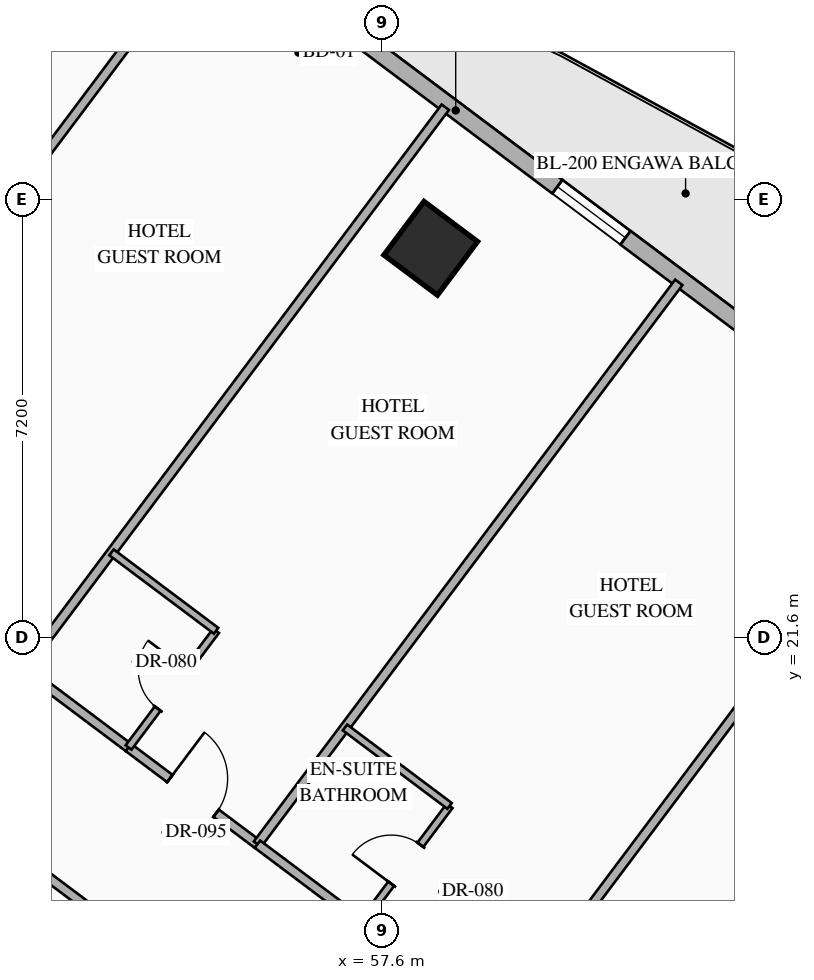
"""IFC4 building model, lengths in metres.
Left out: names, types, materials, properties, quantities, classifications, styles, units other than length and angle.
Written with IfcOpenShell. Run it as: python <this file> out.ifc"""

import sys

from ifc_helpers import new_model, si_unit, direction, frame, frame_2d, origin, origin_2d, place, context, subcontext, project, spatial, rectangle, hollow_rectangle, extrude, element, fill, save


model = new_model("IFC4")
c1 = context("Model", 3, precision=1e-05, world=origin(), true_north=direction((0.0, 1.0)))
c2 = subcontext(c1, "Body", "Model", "MODEL_VIEW")
j1 = project(units=[si_unit("LENGTHUNIT", "METRE"), si_unit("PLANEANGLEUNIT", "RADIAN")], contexts=[c1])
p1 = place(None, origin())
s1 = spatial("IfcSite", under=j1, at=p1, CompositionType="ELEMENT")
p2 = place(p1, origin())
s2 = spatial("IfcBuilding", under=s1, at=p2, CompositionType="ELEMENT")
p3 = place(p2, frame((0.0, 0.0, 43.3)))
s3 = spatial("IfcBuildingStorey", under=s2, at=p3, CompositionType="ELEMENT", Elevation=43.3)
p4 = place(p3, frame((58.4, 28.0, 0.0), z_axis=(0.0, 0.0, 1.0), x_axis=(0.799999996291, -0.600000004945, 0.0)))
e1 = element("IfcColumn", 1, at=p4, inside=s3, PredefinedType="COLUMN", context=c2, shape_type="SweptSolid", body=[
    extrude(hollow_rectangle(XDim=1.1, YDim=1.1, WallThickness=0.04, at=origin_2d()), origin(), (0.0, 0.0, 1.0), 3.35),
])
p5 = place(p3, frame((44.86, 40.73, 0.0), z_axis=(0.0, 0.0, 1.0), x_axis=(0.800006902154, -0.599990797017, 0.0)))
e2 = element("IfcWall", 2, at=p5, inside=s3, PredefinedType="STANDARD", context=c2, shape_type="SweptSolid", body=[
    extrude(rectangle(XDim=29.712, YDim=0.28, at=frame_2d((14.856, 0.0))), origin(), (0.0, 0.0, 1.0), 3.13),
])
p6 = place(p5, frame((14.249, 0.0, 0.0)))
e3 = element("IfcOpeningElement", 3, at=p6, cuts=e2, PredefinedType="OPENING", context=c2, shape_type="SweptSolid", body=[
    extrude(rectangle(XDim=1.1, YDim=2.2, at=frame_2d((0.55, 1.1))), frame((0.0, 0.15, 0.0), z_axis=(0.0, -1.0, 0.0), x_axis=(1.0, 0.0, 0.0)), (0.0, 0.0, 1.0), 0.3),
])
p7 = place(p5, frame((1.612, 0.0, 0.85)))
e4 = element("IfcOpeningElement", 4, at=p7, cuts=e2, PredefinedType="OPENING", context=c2, shape_type="SweptSolid", body=[
    extrude(rectangle(XDim=1.4, YDim=1.8, at=frame_2d((0.7, 0.9))), frame((0.0, 0.15, 0.0), z_axis=(0.0, -1.0, 0.0), x_axis=(1.0, 0.0, 0.0)), (0.0, 0.0, 1.0), 0.3),
])
p8 = place(p5, frame((5.667, 0.0, 0.85)))
e5 = element("IfcOpeningElement", 5, at=p8, cuts=e2, PredefinedType="OPENING", context=c2, shape_type="SweptSolid", body=[
    extrude(rectangle(XDim=1.4, YDim=1.8, at=frame_2d((0.7, 0.9))), frame((0.0, 0.15, 0.0), z_axis=(0.0, -1.0, 0.0), x_axis=(1.0, 0.0, 0.0)), (0.0, 0.0, 1.0), 0.3),
])
p9 = place(p5, frame((9.912, 0.0, 0.85)))
e6 = element("IfcOpeningElement", 6, at=p9, cuts=e2, PredefinedType="OPENING", context=c2, shape_type="SweptSolid", body=[
    extrude(rectangle(XDim=1.4, YDim=1.8, at=frame_2d((0.7, 0.9))), frame((0.0, 0.15, 0.0), z_axis=(0.0, -1.0, 0.0), x_axis=(1.0, 0.0, 0.0)), (0.0, 0.0, 1.0), 0.3),
])
p10 = place(p5, frame((19.528, 0.0, 0.85)))
e7 = element("IfcOpeningElement", 7, at=p10, cuts=e2, PredefinedType="OPENING", context=c2, shape_type="SweptSolid", body=[
    extrude(rectangle(XDim=1.4, YDim=1.8, at=frame_2d((0.7, 0.9))), frame((0.0, 0.15, 0.0), z_axis=(0.0, -1.0, 0.0), x_axis=(1.0, 0.0, 0.0)), (0.0, 0.0, 1.0), 0.3),
])
p11 = place(p5, frame((23.451, 0.0, 0.85)))
e8 = element("IfcOpeningElement", 8, at=p11, cuts=e2, PredefinedType="OPENING", context=c2, shape_type="SweptSolid", body=[
    extrude(rectangle(XDim=1.4, YDim=1.8, at=frame_2d((0.7, 0.9))), frame((0.0, 0.15, 0.0), z_axis=(0.0, -1.0, 0.0), x_axis=(1.0, 0.0, 0.0)), (0.0, 0.0, 1.0), 0.3),
])
p12 = place(p5, frame((27.852, 0.0, 0.85)))
e9 = element("IfcOpeningElement", 9, at=p12, cuts=e2, PredefinedType="OPENING", context=c2, shape_type="SweptSolid", body=[
    extrude(rectangle(XDim=1.4, YDim=1.8, at=frame_2d((0.7, 0.9))), frame((0.0, 0.15, 0.0), z_axis=(0.0, -1.0, 0.0), x_axis=(1.0, 0.0, 0.0)), (0.0, 0.0, 1.0), 0.3),
])
p13 = place(p3, frame((53.318, 2.487, 0.0), z_axis=(0.0, 0.0, 1.0), x_axis=(-0.800004174678, 0.599994433723, 0.0)))
e10 = element("IfcWall", 10, at=p13, inside=s3, PredefinedType="STANDARD", context=c2, shape_type="SweptSolid", body=[
    extrude(rectangle(XDim=35.089, YDim=0.28, at=frame_2d((17.544, 0.0))), origin(), (0.0, 0.0, 1.0), 3.13),
])
p14 = place(p13, frame((1.931, 0.0, 0.85)))
e11 = element("IfcOpeningElement", 11, at=p14, cuts=e10, PredefinedType="OPENING", context=c2, shape_type="SweptSolid", body=[
    extrude(rectangle(XDim=1.4, YDim=1.8, at=frame_2d((0.7, 0.9))), frame((0.0, 0.15, 0.0), z_axis=(0.0, -1.0, 0.0), x_axis=(1.0, 0.0, 0.0)), (0.0, 0.0, 1.0), 0.3),
])
p15 = place(p13, frame((6.819, 0.0, 0.85)))
e12 = element("IfcOpeningElement", 12, at=p15, cuts=e10, PredefinedType="OPENING", context=c2, shape_type="SweptSolid", body=[
    extrude(rectangle(XDim=1.4, YDim=1.8, at=frame_2d((0.7, 0.9))), frame((0.0, 0.15, 0.0), z_axis=(0.0, -1.0, 0.0), x_axis=(1.0, 0.0, 0.0)), (0.0, 0.0, 1.0), 0.3),
])
p16 = place(p13, frame((11.832, 0.0, 0.85)))
e13 = element("IfcOpeningElement", 13, at=p16, cuts=e10, PredefinedType="OPENING", context=c2, shape_type="SweptSolid", body=[
    extrude(rectangle(XDim=1.4, YDim=1.8, at=frame_2d((0.7, 0.9))), frame((0.0, 0.15, 0.0), z_axis=(0.0, -1.0, 0.0), x_axis=(1.0, 0.0, 0.0)), (0.0, 0.0, 1.0), 0.3),
])
p17 = place(p13, frame((17.647, 0.0, 0.85)))
e14 = element("IfcOpeningElement", 14, at=p17, cuts=e10, PredefinedType="OPENING", context=c2, shape_type="SweptSolid", body=[
    extrude(rectangle(XDim=1.4, YDim=1.8, at=frame_2d((0.7, 0.9))), frame((0.0, 0.15, 0.0), z_axis=(0.0, -1.0, 0.0), x_axis=(1.0, 0.0, 0.0)), (0.0, 0.0, 1.0), 0.3),
])
p18 = place(p13, frame((21.857, 0.0, 0.85)))
e15 = element("IfcOpeningElement", 15, at=p18, cuts=e10, PredefinedType="OPENING", context=c2, shape_type="SweptSolid", body=[
    extrude(rectangle(XDim=1.4, YDim=1.8, at=frame_2d((0.7, 0.9))), frame((0.0, 0.15, 0.0), z_axis=(0.0, -1.0, 0.0), x_axis=(1.0, 0.0, 0.0)), (0.0, 0.0, 1.0), 0.3),
])
p19 = place(p13, frame((26.87, 0.0, 0.85)))
e16 = element("IfcOpeningElement", 16, at=p19, cuts=e10, PredefinedType="OPENING", context=c2, shape_type="SweptSolid", body=[
    extrude(rectangle(XDim=1.4, YDim=1.8, at=frame_2d((0.7, 0.9))), frame((0.0, 0.15, 0.0), z_axis=(0.0, -1.0, 0.0), x_axis=(1.0, 0.0, 0.0)), (0.0, 0.0, 1.0), 0.3),
])
p20 = place(p13, frame((31.757, 0.0, 0.85)))
e17 = element("IfcOpeningElement", 17, at=p20, cuts=e10, PredefinedType="OPENING", context=c2, shape_type="SweptSolid", body=[
    extrude(rectangle(XDim=1.4, YDim=1.8, at=frame_2d((0.7, 0.9))), frame((0.0, 0.15, 0.0), z_axis=(0.0, -1.0, 0.0), x_axis=(1.0, 0.0, 0.0)), (0.0, 0.0, 1.0), 0.3),
])
for number, where, z_axis, x_axis in (
    (18, (47.87, 23.96, 0.0), (0.0, 0.0, 1.0), (0.6, 0.8, 0.0)),
    (19, (51.71, 21.08, 0.0), (0.0, 0.0, 1.0), (0.6, 0.8, 0.0)),
):
    element("IfcWall", number, at=place(p3, frame(where, z_axis=z_axis, x_axis=x_axis)), inside=s3, PredefinedType="PARTITIONING", context=c2, shape_type="SweptSolid", body=[
        extrude(rectangle(XDim=11.55, YDim=0.15, at=frame_2d((5.775, 0.0))), origin(), (0.0, 0.0, 1.0), 3.13),
    ])
p21 = place(p3, frame((51.71, 21.08, 0.0), z_axis=(0.0, 0.0, 1.0), x_axis=(0.79998637334, -0.60001816845, 0.0)))
e20 = element("IfcWall", 20, at=p21, inside=s3, PredefinedType="PARTITIONING", context=c2, shape_type="SweptSolid", body=[
    extrude(rectangle(XDim=2.15, YDim=0.15, at=frame_2d((1.075, 0.0))), origin(), (0.0, 0.0, 1.0), 2.775),
])
p22 = place(p3, frame((53.43, 19.79, 0.0), z_axis=(0.0, 0.0, 1.0), x_axis=(0.8, -0.6, 0.0)))
e21 = element("IfcWall", 21, at=p22, inside=s3, PredefinedType="PARTITIONING", context=c2, shape_type="SweptSolid", body=[
    extrude(rectangle(XDim=2.65, YDim=0.15, at=frame_2d((1.325, 0.0))), origin(), (0.0, 0.0, 1.0), 2.775),
])
p23 = place(p22, frame((0.85, 0.0, 0.0)))
e22 = element("IfcOpeningElement", 22, at=p23, cuts=e21, PredefinedType="OPENING", context=c2, shape_type="SweptSolid", body=[
    extrude(rectangle(XDim=0.95, YDim=2.15, at=frame_2d((0.475, 1.075))), frame((0.0, 0.085, 0.0), z_axis=(0.0, -1.0, 0.0), x_axis=(1.0, 0.0, 0.0)), (0.0, 0.0, 1.0), 0.17),
])
p24 = place(p3, frame((53.43, 19.79, 0.0), z_axis=(0.0, 0.0, 1.0), x_axis=(0.600065100855, 0.79995117022, 0.0)))
e23 = element("IfcWall", 23, at=p24, inside=s3, PredefinedType="PARTITIONING", context=c2, shape_type="SweptSolid", body=[
    extrude(rectangle(XDim=2.4, YDim=0.12, at=frame_2d((1.2, 0.0))), origin(), (0.0, 0.0, 1.0), 3.13),
])
p25 = place(p24, frame((0.8, 0.0, 0.0)))
e24 = element("IfcOpeningElement", 24, at=p25, cuts=e23, PredefinedType="OPENING", context=c2, shape_type="SweptSolid", body=[
    extrude(rectangle(XDim=0.8, YDim=2.06, at=frame_2d((0.4, 1.03))), frame((0.0, 0.07, 0.0), z_axis=(0.0, -1.0, 0.0), x_axis=(1.0, 0.0, 0.0)), (0.0, 0.0, 1.0), 0.14),
])
p26 = place(p3, frame((53.15, 23.0, 0.0), z_axis=(0.0, 0.0, 1.0), x_axis=(0.800027249606, -0.599963665473, 0.0)))
e25 = element("IfcWall", 25, at=p26, inside=s3, PredefinedType="PARTITIONING", context=c2, shape_type="SweptSolid", body=[
    extrude(rectangle(XDim=2.15, YDim=0.12, at=frame_2d((1.075, 0.0))), origin(), (0.0, 0.0, 1.0), 3.13),
])
p27 = place(p3, frame((55.55, 18.2, 0.0), z_axis=(0.0, 0.0, 1.0), x_axis=(0.599996617946, 0.80000253653, 0.0)))
e26 = element("IfcWall", 26, at=p27, inside=s3, PredefinedType="PARTITIONING", context=c2, shape_type="SweptSolid", body=[
    extrude(rectangle(XDim=11.55, YDim=0.15, at=frame_2d((5.775, 0.0))), origin(), (0.0, 0.0, 1.0), 3.13),
])
p28 = place(p3, frame((55.55, 18.2, 0.0), z_axis=(0.0, 0.0, 1.0), x_axis=(0.79998637334, -0.60001816845, 0.0)))
e27 = element("IfcWall", 27, at=p28, inside=s3, PredefinedType="PARTITIONING", context=c2, shape_type="SweptSolid", body=[
    extrude(rectangle(XDim=2.15, YDim=0.15, at=frame_2d((1.075, 0.0))), origin(), (0.0, 0.0, 1.0), 2.775),
])
p29 = place(p3, frame((57.27, 16.91, 0.0), z_axis=(0.0, 0.0, 1.0), x_axis=(0.599951172744, 0.800036618114, 0.0)))
e28 = element("IfcWall", 28, at=p29, inside=s3, PredefinedType="PARTITIONING", context=c2, shape_type="SweptSolid", body=[
    extrude(rectangle(XDim=2.4, YDim=0.12, at=frame_2d((1.2, 0.0))), origin(), (0.0, 0.0, 1.0), 3.13),
])
p30 = place(p29, frame((0.8, 0.0, 0.0)))
e29 = element("IfcOpeningElement", 29, at=p30, cuts=e28, PredefinedType="OPENING", context=c2, shape_type="SweptSolid", body=[
    extrude(rectangle(XDim=0.8, YDim=2.06, at=frame_2d((0.4, 1.03))), frame((0.0, 0.07, 0.0), z_axis=(0.0, -1.0, 0.0), x_axis=(1.0, 0.0, 0.0)), (0.0, 0.0, 1.0), 0.14),
])
p31 = place(p3, frame((56.99, 20.12, 0.0), z_axis=(0.0, 0.0, 1.0), x_axis=(0.79998637334, -0.60001816845, 0.0)))
e30 = element("IfcWall", 30, at=p31, inside=s3, PredefinedType="PARTITIONING", context=c2, shape_type="SweptSolid", body=[
    extrude(rectangle(XDim=2.15, YDim=0.12, at=frame_2d((1.075, 0.0))), origin(), (0.0, 0.0, 1.0), 3.13),
])
p32 = place(p3, frame((59.55, 15.2, 0.0), z_axis=(0.0, 0.0, 1.0), x_axis=(0.599996617946, 0.80000253653, 0.0)))
e31 = element("IfcWall", 31, at=p32, inside=s3, PredefinedType="PARTITIONING", context=c2, shape_type="SweptSolid", body=[
    extrude(rectangle(XDim=11.55, YDim=0.15, at=frame_2d((5.775, 0.0))), origin(), (0.0, 0.0, 1.0), 3.13),
])
p33 = place(p3, frame((51.17, 18.36, 0.0), z_axis=(0.0, 0.0, 1.0), x_axis=(0.79998637334, -0.60001816845, 0.0)))
e32 = element("IfcWall", 32, at=p33, inside=s3, PredefinedType="PARTITIONING", context=c2, shape_type="SweptSolid", body=[
    extrude(rectangle(XDim=2.15, YDim=0.15, at=frame_2d((1.075, 0.0))), origin(), (0.0, 0.0, 1.0), 2.425),
])
p34 = place(p10, origin())
e33 = element("IfcWindow", 33, at=p34, inside=s3, PartitioningType="SINGLE_PANEL", PredefinedType="WINDOW", context=c2, shape_type="SweptSolid", body=[
    extrude(rectangle(XDim=1.4, YDim=1.8, at=frame_2d((0.7, 0.9))), frame((0.0, 0.03, 0.0), z_axis=(0.0, -1.0, 0.0), x_axis=(1.0, 0.0, 0.0)), (0.0, 0.0, 1.0), 0.06),
])
fill(e7, e33)
p35 = place(p23, origin())
e34 = element("IfcDoor", 34, at=p35, inside=s3, OperationType="SINGLE_SWING_LEFT", PredefinedType="DOOR", context=c2, shape_type="SweptSolid", body=[
    extrude(rectangle(XDim=0.95, YDim=2.15, at=frame_2d((0.475, 1.075))), frame((0.0, 0.025, 0.0), z_axis=(0.0, -1.0, 0.0), x_axis=(1.0, 0.0, 0.0)), (0.0, 0.0, 1.0), 0.05),
])
fill(e22, e34)
p36 = place(p25, origin())
e35 = element("IfcDoor", 35, at=p36, inside=s3, OperationType="SINGLE_SWING_RIGHT", PredefinedType="DOOR", context=c2, shape_type="SweptSolid", body=[
    extrude(rectangle(XDim=0.8, YDim=2.06, at=frame_2d((0.4, 1.03))), frame((0.0, 0.025, 0.0), z_axis=(0.0, -1.0, 0.0), x_axis=(1.0, 0.0, 0.0)), (0.0, 0.0, 1.0), 0.05),
])
fill(e24, e35)
p37 = place(p30, origin())
e36 = element("IfcDoor", 36, at=p37, inside=s3, OperationType="SINGLE_SWING_LEFT", PredefinedType="DOOR", context=c2, shape_type="SweptSolid", body=[
    extrude(rectangle(XDim=0.8, YDim=2.06, at=frame_2d((0.4, 1.03))), frame((0.0, 0.025, 0.0), z_axis=(0.0, -1.0, 0.0), x_axis=(1.0, 0.0, 0.0)), (0.0, 0.0, 1.0), 0.05),
])
fill(e29, e36)
save(model, sys.argv[1])
